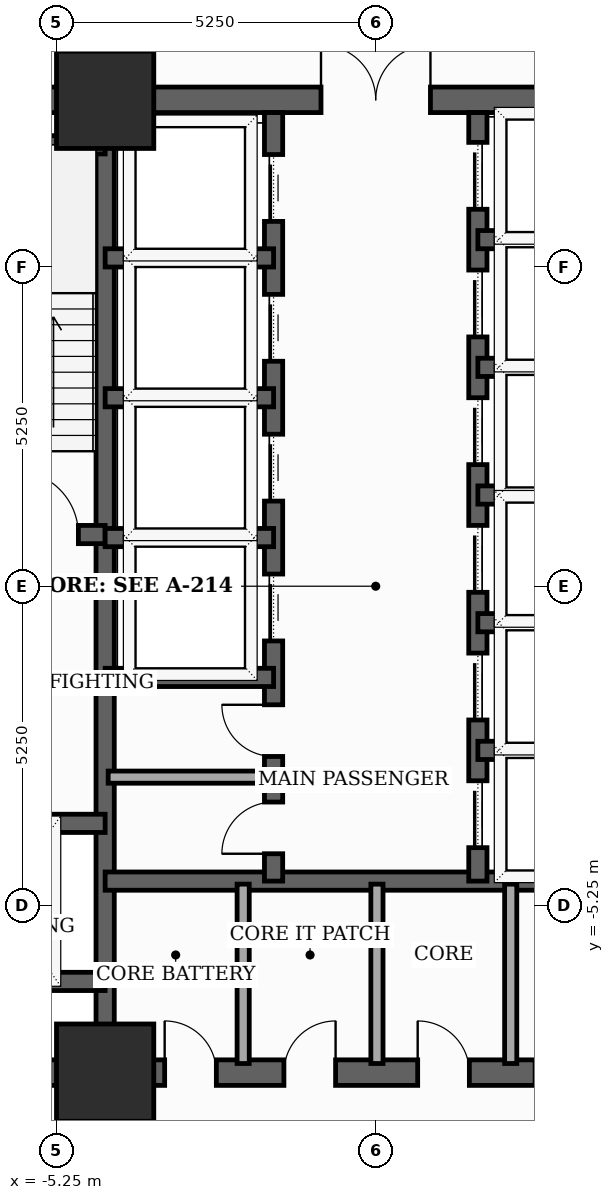
"""IFC4 building model, lengths in metres.
Left out: names, types, materials, properties, quantities, classifications, styles, units other than length and angle.
Written with IfcOpenShell. Run it as: python <this file> out.ifc"""

import sys

from ifc_helpers import new_model, si_unit, direction, frame, frame_2d, origin, origin_2d, place, context, subcontext, project, spatial, rectangle, extrude, element, fill, save


model = new_model("IFC4")
c1 = context("Model", 3, precision=1e-05, world=origin(), true_north=direction((0.0, 1.0)))
c2 = subcontext(c1, "Body", "Model", "MODEL_VIEW")
j1 = project(units=[si_unit("LENGTHUNIT", "METRE"), si_unit("PLANEANGLEUNIT", "RADIAN")], contexts=[c1])
p1 = place(None, origin())
s1 = spatial("IfcSite", under=j1, at=p1, CompositionType="ELEMENT")
p2 = place(p1, origin())
s2 = spatial("IfcBuilding", under=s1, at=p2, CompositionType="ELEMENT")
p3 = place(p2, frame((0.0, 0.0, 77.8)))
s3 = spatial("IfcBuildingStorey", under=s2, at=p3, CompositionType="ELEMENT", Elevation=77.8)
for number, where, z_axis, x_axis in (
    (1, (-4.45, -8.0, 0.0), (0.0, 0.0, 1.0), (1.0, 0.0, 0.0)),
    (2, (-4.45, 8.0, 0.0), (0.0, 0.0, 1.0), (1.0, 0.0, 0.0)),
):
    element("IfcColumn", number, at=place(p3, frame(where, z_axis=z_axis, x_axis=x_axis)), inside=s3, PredefinedType="COLUMN", context=c2, shape_type="SweptSolid", body=[
        extrude(rectangle(XDim=1.6, YDim=1.6, at=origin_2d()), origin(), (0.0, 0.0, 1.0), 3.7),
    ])
p4 = place(p3, frame((-8.0, -8.0, 0.0), z_axis=(0.0, 0.0, 1.0), x_axis=(1.0, 0.0, 0.0)))
e3 = element("IfcWall", 3, at=p4, inside=s3, PredefinedType="SHEAR", context=c2, shape_type="SweptSolid", body=[
    extrude(rectangle(XDim=16.0, YDim=0.42, at=frame_2d((8.0, 0.0))), origin(), (0.0, 0.0, 1.0), 3.5),
])
p5 = place(p4, frame((4.529, 0.0, 0.0)))
e4 = element("IfcOpeningElement", 4, at=p5, cuts=e3, PredefinedType="OPENING", context=c2, shape_type="SweptSolid", body=[
    extrude(rectangle(XDim=0.85, YDim=2.02, at=frame_2d((0.425, 1.01))), frame((0.0, 0.22, 0.0), z_axis=(0.0, -1.0, 0.0), x_axis=(1.0, 0.0, 0.0)), (0.0, 0.0, 1.0), 0.44),
])
p6 = place(p4, frame((6.49, 0.0, 0.0)))
e5 = element("IfcOpeningElement", 5, at=p6, cuts=e3, PredefinedType="OPENING", context=c2, shape_type="SweptSolid", body=[
    extrude(rectangle(XDim=0.85, YDim=2.02, at=frame_2d((0.425, 1.01))), frame((0.0, 0.22, 0.0), z_axis=(0.0, -1.0, 0.0), x_axis=(1.0, 0.0, 0.0)), (0.0, 0.0, 1.0), 0.44),
])
p7 = place(p4, frame((8.69, 0.0, 0.0)))
e6 = element("IfcOpeningElement", 6, at=p7, cuts=e3, PredefinedType="OPENING", context=c2, shape_type="SweptSolid", body=[
    extrude(rectangle(XDim=0.85, YDim=2.02, at=frame_2d((0.425, 1.01))), frame((0.0, 0.22, 0.0), z_axis=(0.0, -1.0, 0.0), x_axis=(1.0, 0.0, 0.0)), (0.0, 0.0, 1.0), 0.44),
])
p8 = place(p4, frame((10.621, 0.0, 0.0)))
e7 = element("IfcOpeningElement", 7, at=p8, cuts=e3, PredefinedType="OPENING", context=c2, shape_type="SweptSolid", body=[
    extrude(rectangle(XDim=0.85, YDim=2.02, at=frame_2d((0.425, 1.01))), frame((0.0, 0.22, 0.0), z_axis=(0.0, -1.0, 0.0), x_axis=(1.0, 0.0, 0.0)), (0.0, 0.0, 1.0), 0.44),
])
p9 = place(p3, frame((-8.0, 8.0, 0.0), z_axis=(0.0, 0.0, 1.0), x_axis=(1.0, 0.0, 0.0)))
e8 = element("IfcWall", 8, at=p9, inside=s3, PredefinedType="SHEAR", context=c2, shape_type="SweptSolid", body=[
    extrude(rectangle(XDim=16.0, YDim=0.42, at=frame_2d((8.0, 0.0))), origin(), (0.0, 0.0, 1.0), 3.5),
])
p10 = place(p9, frame((7.1, 0.0, 0.0)))
e9 = element("IfcOpeningElement", 9, at=p10, cuts=e8, PredefinedType="OPENING", context=c2, shape_type="SweptSolid", body=[
    extrude(rectangle(XDim=1.8, YDim=2.15, at=frame_2d((0.9, 1.075))), frame((0.0, 0.22, 0.0), z_axis=(0.0, -1.0, 0.0), x_axis=(1.0, 0.0, 0.0)), (0.0, 0.0, 1.0), 0.44),
])
p11 = place(p3, frame((-4.45, -7.79, 0.0), z_axis=(0.0, 0.0, 1.0), x_axis=(0.0, 1.0, 0.0)))
e10 = element("IfcWall", 10, at=p11, inside=s3, PredefinedType="SHEAR", context=c2, shape_type="SweptSolid", body=[
    extrude(rectangle(XDim=15.58, YDim=0.3, at=frame_2d((7.79, 0.0))), origin(), (0.0, 0.0, 1.0), 3.5),
])
p12 = place(p3, frame((-7.79, 0.85, 0.0), z_axis=(0.0, 0.0, 1.0), x_axis=(1.0, 0.0, 0.0)))
e11 = element("IfcWall", 11, at=p12, inside=s3, PredefinedType="SHEAR", context=c2, shape_type="SweptSolid", body=[
    extrude(rectangle(XDim=3.34, YDim=0.3, at=frame_2d((1.67, 0.0))), origin(), (0.0, 0.0, 1.0), 3.5),
])
p13 = place(p12, frame((1.85, 0.0, 0.0)))
e12 = element("IfcOpeningElement", 12, at=p13, cuts=e11, PredefinedType="OPENING", context=c2, shape_type="SweptSolid", body=[
    extrude(rectangle(XDim=1.05, YDim=2.15, at=frame_2d((0.525, 1.075))), frame((0.0, 0.16, 0.0), z_axis=(0.0, -1.0, 0.0), x_axis=(1.0, 0.0, 0.0)), (0.0, 0.0, 1.0), 0.32),
])
p14 = place(p3, frame((-7.79, 7.26, 0.0), z_axis=(0.0, 0.0, 1.0), x_axis=(1.0, 0.0, 0.0)))
e13 = element("IfcWall", 13, at=p14, inside=s3, PredefinedType="SHEAR", context=c2, shape_type="SweptSolid", body=[
    extrude(rectangle(XDim=3.34, YDim=0.3, at=frame_2d((1.67, 0.0))), origin(), (0.0, 0.0, 1.0), 3.5),
])
p15 = place(p3, frame((-7.79, -3.9, 0.0), z_axis=(0.0, 0.0, 1.0), x_axis=(1.0, 0.0, 0.0)))
e14 = element("IfcWall", 14, at=p15, inside=s3, PredefinedType="SHEAR", context=c2, shape_type="SweptSolid", body=[
    extrude(rectangle(XDim=3.34, YDim=0.3, at=frame_2d((1.67, 0.0))), origin(), (0.0, 0.0, 1.0), 3.5),
])
p16 = place(p15, frame((1.27, 0.0, 0.0)))
e15 = element("IfcOpeningElement", 15, at=p16, cuts=e14, PredefinedType="OPENING", context=c2, shape_type="SweptSolid", body=[
    extrude(rectangle(XDim=1.1, YDim=2.1, at=frame_2d((0.55, 1.05))), frame((0.0, 0.16, 0.0), z_axis=(0.0, -1.0, 0.0), x_axis=(1.0, 0.0, 0.0)), (0.0, 0.0, 1.0), 0.32),
])
p17 = place(p3, frame((-7.79, -6.5, 0.0), z_axis=(0.0, 0.0, 1.0), x_axis=(1.0, 0.0, 0.0)))
e16 = element("IfcWall", 16, at=p17, inside=s3, PredefinedType="SHEAR", context=c2, shape_type="SweptSolid", body=[
    extrude(rectangle(XDim=3.34, YDim=0.3, at=frame_2d((1.67, 0.0))), origin(), (0.0, 0.0, 1.0), 3.5),
])
p18 = place(p3, frame((-4.45, -4.85, 0.0), z_axis=(0.0, 0.0, 1.0), x_axis=(1.0, 0.0, 0.0)))
e17 = element("IfcWall", 17, at=p18, inside=s3, PredefinedType="SHEAR", context=c2, shape_type="SweptSolid", body=[
    extrude(rectangle(XDim=8.9, YDim=0.3, at=frame_2d((4.45, 0.0))), origin(), (0.0, 0.0, 1.0), 3.5),
])
p19 = place(p3, frame((-1.68, -4.85, 0.0), z_axis=(0.0, 0.0, 1.0), x_axis=(0.0, 1.0, 0.0)))
e18 = element("IfcWall", 18, at=p19, inside=s3, PredefinedType="SHEAR", context=c2, shape_type="SweptSolid", body=[
    extrude(rectangle(XDim=12.64, YDim=0.3, at=frame_2d((6.32, 0.0))), origin(), (0.0, 0.0, 1.0), 3.5),
])
p20 = place(p19, frame((3.95, 0.0, 0.0)))
e19 = element("IfcOpeningElement", 19, at=p20, cuts=e18, PredefinedType="OPENING", context=c2, shape_type="SweptSolid", body=[
    extrude(rectangle(XDim=1.1, YDim=2.1, at=frame_2d((0.55, 1.05))), frame((0.0, 0.16, 0.0), z_axis=(0.0, -1.0, 0.0), x_axis=(1.0, 0.0, 0.0)), (0.0, 0.0, 1.0), 0.32),
])
p21 = place(p19, frame((6.25, 0.0, 0.0)))
e20 = element("IfcOpeningElement", 20, at=p21, cuts=e18, PredefinedType="OPENING", context=c2, shape_type="SweptSolid", body=[
    extrude(rectangle(XDim=1.1, YDim=2.1, at=frame_2d((0.55, 1.05))), frame((0.0, 0.16, 0.0), z_axis=(0.0, -1.0, 0.0), x_axis=(1.0, 0.0, 0.0)), (0.0, 0.0, 1.0), 0.32),
])
p22 = place(p19, frame((8.55, 0.0, 0.0)))
e21 = element("IfcOpeningElement", 21, at=p22, cuts=e18, PredefinedType="OPENING", context=c2, shape_type="SweptSolid", body=[
    extrude(rectangle(XDim=1.1, YDim=2.1, at=frame_2d((0.55, 1.05))), frame((0.0, 0.16, 0.0), z_axis=(0.0, -1.0, 0.0), x_axis=(1.0, 0.0, 0.0)), (0.0, 0.0, 1.0), 0.32),
])
p23 = place(p19, frame((10.85, 0.0, 0.0)))
e22 = element("IfcOpeningElement", 22, at=p23, cuts=e18, PredefinedType="OPENING", context=c2, shape_type="SweptSolid", body=[
    extrude(rectangle(XDim=1.1, YDim=2.1, at=frame_2d((0.55, 1.05))), frame((0.0, 0.16, 0.0), z_axis=(0.0, -1.0, 0.0), x_axis=(1.0, 0.0, 0.0)), (0.0, 0.0, 1.0), 0.32),
])
p24 = place(p19, frame((0.45, 0.0, 0.0)))
e23 = element("IfcOpeningElement", 23, at=p24, cuts=e18, PredefinedType="OPENING", context=c2, shape_type="SweptSolid", body=[
    extrude(rectangle(XDim=0.85, YDim=2.02, at=frame_2d((0.425, 1.01))), frame((0.0, 0.16, 0.0), z_axis=(0.0, -1.0, 0.0), x_axis=(1.0, 0.0, 0.0)), (0.0, 0.0, 1.0), 0.32),
])
p25 = place(p19, frame((2.05, 0.0, 0.0)))
e24 = element("IfcOpeningElement", 24, at=p25, cuts=e18, PredefinedType="OPENING", context=c2, shape_type="SweptSolid", body=[
    extrude(rectangle(XDim=0.85, YDim=2.02, at=frame_2d((0.425, 1.01))), frame((0.0, 0.16, 0.0), z_axis=(0.0, -1.0, 0.0), x_axis=(1.0, 0.0, 0.0)), (0.0, 0.0, 1.0), 0.32),
])
p26 = place(p3, frame((1.68, -4.85, 0.0), z_axis=(0.0, 0.0, 1.0), x_axis=(0.0, 1.0, 0.0)))
e25 = element("IfcWall", 25, at=p26, inside=s3, PredefinedType="SHEAR", context=c2, shape_type="SweptSolid", body=[
    extrude(rectangle(XDim=12.64, YDim=0.3, at=frame_2d((6.32, 0.0))), origin(), (0.0, 0.0, 1.0), 3.5),
])
p27 = place(p26, frame((0.55, 0.0, 0.0)))
e26 = element("IfcOpeningElement", 26, at=p27, cuts=e25, PredefinedType="OPENING", context=c2, shape_type="SweptSolid", body=[
    extrude(rectangle(XDim=1.1, YDim=2.1, at=frame_2d((0.55, 1.05))), frame((0.0, 0.16, 0.0), z_axis=(0.0, -1.0, 0.0), x_axis=(1.0, 0.0, 0.0)), (0.0, 0.0, 1.0), 0.32),
])
p28 = place(p26, frame((2.65, 0.0, 0.0)))
e27 = element("IfcOpeningElement", 27, at=p28, cuts=e25, PredefinedType="OPENING", context=c2, shape_type="SweptSolid", body=[
    extrude(rectangle(XDim=1.1, YDim=2.1, at=frame_2d((0.55, 1.05))), frame((0.0, 0.16, 0.0), z_axis=(0.0, -1.0, 0.0), x_axis=(1.0, 0.0, 0.0)), (0.0, 0.0, 1.0), 0.32),
])
p29 = place(p26, frame((4.75, 0.0, 0.0)))
e28 = element("IfcOpeningElement", 28, at=p29, cuts=e25, PredefinedType="OPENING", context=c2, shape_type="SweptSolid", body=[
    extrude(rectangle(XDim=1.1, YDim=2.1, at=frame_2d((0.55, 1.05))), frame((0.0, 0.16, 0.0), z_axis=(0.0, -1.0, 0.0), x_axis=(1.0, 0.0, 0.0)), (0.0, 0.0, 1.0), 0.32),
])
p30 = place(p26, frame((6.85, 0.0, 0.0)))
e29 = element("IfcOpeningElement", 29, at=p30, cuts=e25, PredefinedType="OPENING", context=c2, shape_type="SweptSolid", body=[
    extrude(rectangle(XDim=1.1, YDim=2.1, at=frame_2d((0.55, 1.05))), frame((0.0, 0.16, 0.0), z_axis=(0.0, -1.0, 0.0), x_axis=(1.0, 0.0, 0.0)), (0.0, 0.0, 1.0), 0.32),
])
p31 = place(p26, frame((8.95, 0.0, 0.0)))
e30 = element("IfcOpeningElement", 30, at=p31, cuts=e25, PredefinedType="OPENING", context=c2, shape_type="SweptSolid", body=[
    extrude(rectangle(XDim=1.1, YDim=2.1, at=frame_2d((0.55, 1.05))), frame((0.0, 0.16, 0.0), z_axis=(0.0, -1.0, 0.0), x_axis=(1.0, 0.0, 0.0)), (0.0, 0.0, 1.0), 0.32),
])
p32 = place(p26, frame((11.05, 0.0, 0.0)))
e31 = element("IfcOpeningElement", 31, at=p32, cuts=e25, PredefinedType="OPENING", context=c2, shape_type="SweptSolid", body=[
    extrude(rectangle(XDim=1.1, YDim=2.1, at=frame_2d((0.55, 1.05))), frame((0.0, 0.16, 0.0), z_axis=(0.0, -1.0, 0.0), x_axis=(1.0, 0.0, 0.0)), (0.0, 0.0, 1.0), 0.32),
])
for number, where, z_axis, x_axis in (
    (32, (-4.45, -1.5, 0.0), (0.0, 0.0, 1.0), (1.0, 0.0, 0.0)),
    (33, (-4.45, 0.8, 0.0), (0.0, 0.0, 1.0), (1.0, 0.0, 0.0)),
    (34, (-4.45, 3.1, 0.0), (0.0, 0.0, 1.0), (1.0, 0.0, 0.0)),
    (35, (-4.45, 5.4, 0.0), (0.0, 0.0, 1.0), (1.0, 0.0, 0.0)),
    (36, (1.68, 1.5, 0.0), (0.0, 0.0, 1.0), (1.0, 0.0, 0.0)),
    (37, (1.68, 3.6, 0.0), (0.0, 0.0, 1.0), (1.0, 0.0, 0.0)),
    (38, (1.68, 5.7, 0.0), (0.0, 0.0, 1.0), (1.0, 0.0, 0.0)),
    (39, (1.68, -2.7, 0.0), (0.0, 0.0, 1.0), (1.0, 0.0, 0.0)),
    (40, (1.68, -0.6, 0.0), (0.0, 0.0, 1.0), (1.0, 0.0, 0.0)),
):
    element("IfcWall", number, at=place(p3, frame(where, z_axis=z_axis, x_axis=x_axis)), inside=s3, PredefinedType="SHEAR", context=c2, shape_type="SweptSolid", body=[
        extrude(rectangle(XDim=2.77, YDim=0.3, at=frame_2d((1.385, 0.0))), origin(), (0.0, 0.0, 1.0), 3.5),
    ])
for number, where, z_axis, x_axis in (
    (41, (-2.18, -7.85, 0.0), (0.0, 0.0, 1.0), (0.0, 1.0, 0.0)),
    (42, (0.02, -7.85, 0.0), (0.0, 0.0, 1.0), (0.0, 1.0, 0.0)),
    (43, (2.22, -7.85, 0.0), (0.0, 0.0, 1.0), (0.0, 1.0, 0.0)),
):
    element("IfcWall", number, at=place(p3, frame(where, z_axis=z_axis, x_axis=x_axis)), inside=s3, PredefinedType="SOLIDWALL", context=c2, shape_type="SweptSolid", body=[
        extrude(rectangle(XDim=2.95, YDim=0.2, at=frame_2d((1.475, 0.0))), origin(), (0.0, 0.0, 1.0), 2.885),
    ])
p33 = place(p3, frame((-4.4, -3.14, 0.0), z_axis=(0.0, 0.0, 1.0), x_axis=(1.0, 0.0, 0.0)))
e44 = element("IfcWall", 44, at=p33, inside=s3, PredefinedType="SOLIDWALL", context=c2, shape_type="SweptSolid", body=[
    extrude(rectangle(XDim=2.68, YDim=0.2, at=frame_2d((1.34, 0.0))), origin(), (0.0, 0.0, 1.0), 3.5),
])
p34 = place(p5, origin())
e45 = element("IfcDoor", 45, at=p34, inside=s3, OperationType="SINGLE_SWING_LEFT", PredefinedType="TRAPDOOR", context=c2, shape_type="SweptSolid", body=[
    extrude(rectangle(XDim=0.85, YDim=2.02, at=frame_2d((0.425, 1.01))), frame((0.0, 0.025, 0.0), z_axis=(0.0, -1.0, 0.0), x_axis=(1.0, 0.0, 0.0)), (0.0, 0.0, 1.0), 0.05),
])
fill(e4, e45)
p35 = place(p6, origin())
e46 = element("IfcDoor", 46, at=p35, inside=s3, OperationType="SINGLE_SWING_RIGHT", PredefinedType="TRAPDOOR", context=c2, shape_type="SweptSolid", body=[
    extrude(rectangle(XDim=0.85, YDim=2.02, at=frame_2d((0.425, 1.01))), frame((0.0, 0.025, 0.0), z_axis=(0.0, -1.0, 0.0), x_axis=(1.0, 0.0, 0.0)), (0.0, 0.0, 1.0), 0.05),
])
fill(e5, e46)
p36 = place(p7, origin())
e47 = element("IfcDoor", 47, at=p36, inside=s3, OperationType="SINGLE_SWING_LEFT", PredefinedType="TRAPDOOR", context=c2, shape_type="SweptSolid", body=[
    extrude(rectangle(XDim=0.85, YDim=2.02, at=frame_2d((0.425, 1.01))), frame((0.0, 0.025, 0.0), z_axis=(0.0, -1.0, 0.0), x_axis=(1.0, 0.0, 0.0)), (0.0, 0.0, 1.0), 0.05),
])
fill(e6, e47)
p37 = place(p10, origin())
e48 = element("IfcDoor", 48, at=p37, inside=s3, OperationType="DOUBLE_DOOR_SINGLE_SWING", PredefinedType="DOOR", context=c2, shape_type="SweptSolid", body=[
    extrude(rectangle(XDim=1.8, YDim=2.15, at=frame_2d((0.9, 1.075))), frame((0.0, 0.025, 0.0), z_axis=(0.0, -1.0, 0.0), x_axis=(1.0, 0.0, 0.0)), (0.0, 0.0, 1.0), 0.05),
])
fill(e9, e48)
p38 = place(p13, origin())
e49 = element("IfcDoor", 49, at=p38, inside=s3, OperationType="SINGLE_SWING_LEFT", PredefinedType="DOOR", context=c2, shape_type="SweptSolid", body=[
    extrude(rectangle(XDim=1.05, YDim=2.15, at=frame_2d((0.525, 1.075))), frame((0.0, 0.025, 0.0), z_axis=(0.0, -1.0, 0.0), x_axis=(1.0, 0.0, 0.0)), (0.0, 0.0, 1.0), 0.05),
])
fill(e12, e49)
p39 = place(p20, origin())
e50 = element("IfcDoor", 50, at=p39, inside=s3, OperationType="SLIDING_TO_LEFT", PredefinedType="DOOR", context=c2, shape_type="SweptSolid", body=[
    extrude(rectangle(XDim=1.1, YDim=2.1, at=frame_2d((0.55, 1.05))), frame((0.0, 0.025, 0.0), z_axis=(0.0, -1.0, 0.0), x_axis=(1.0, 0.0, 0.0)), (0.0, 0.0, 1.0), 0.05),
])
fill(e19, e50)
p40 = place(p21, origin())
e51 = element("IfcDoor", 51, at=p40, inside=s3, OperationType="SLIDING_TO_LEFT", PredefinedType="DOOR", context=c2, shape_type="SweptSolid", body=[
    extrude(rectangle(XDim=1.1, YDim=2.1, at=frame_2d((0.55, 1.05))), frame((0.0, 0.025, 0.0), z_axis=(0.0, -1.0, 0.0), x_axis=(1.0, 0.0, 0.0)), (0.0, 0.0, 1.0), 0.05),
])
fill(e20, e51)
p41 = place(p22, origin())
e52 = element("IfcDoor", 52, at=p41, inside=s3, OperationType="SLIDING_TO_LEFT", PredefinedType="DOOR", context=c2, shape_type="SweptSolid", body=[
    extrude(rectangle(XDim=1.1, YDim=2.1, at=frame_2d((0.55, 1.05))), frame((0.0, 0.025, 0.0), z_axis=(0.0, -1.0, 0.0), x_axis=(1.0, 0.0, 0.0)), (0.0, 0.0, 1.0), 0.05),
])
fill(e21, e52)
p42 = place(p23, origin())
e53 = element("IfcDoor", 53, at=p42, inside=s3, OperationType="SLIDING_TO_LEFT", PredefinedType="DOOR", context=c2, shape_type="SweptSolid", body=[
    extrude(rectangle(XDim=1.1, YDim=2.1, at=frame_2d((0.55, 1.05))), frame((0.0, 0.025, 0.0), z_axis=(0.0, -1.0, 0.0), x_axis=(1.0, 0.0, 0.0)), (0.0, 0.0, 1.0), 0.05),
])
fill(e22, e53)
p43 = place(p24, origin())
e54 = element("IfcDoor", 54, at=p43, inside=s3, OperationType="SINGLE_SWING_LEFT", PredefinedType="TRAPDOOR", context=c2, shape_type="SweptSolid", body=[
    extrude(rectangle(XDim=0.85, YDim=2.02, at=frame_2d((0.425, 1.01))), frame((0.0, 0.025, 0.0), z_axis=(0.0, -1.0, 0.0), x_axis=(1.0, 0.0, 0.0)), (0.0, 0.0, 1.0), 0.05),
])
fill(e23, e54)
p44 = place(p25, origin())
e55 = element("IfcDoor", 55, at=p44, inside=s3, OperationType="SINGLE_SWING_RIGHT", PredefinedType="TRAPDOOR", context=c2, shape_type="SweptSolid", body=[
    extrude(rectangle(XDim=0.85, YDim=2.02, at=frame_2d((0.425, 1.01))), frame((0.0, 0.025, 0.0), z_axis=(0.0, -1.0, 0.0), x_axis=(1.0, 0.0, 0.0)), (0.0, 0.0, 1.0), 0.05),
])
fill(e24, e55)
p45 = place(p27, origin())
e56 = element("IfcDoor", 56, at=p45, inside=s3, OperationType="SLIDING_TO_LEFT", PredefinedType="DOOR", context=c2, shape_type="SweptSolid", body=[
    extrude(rectangle(XDim=1.1, YDim=2.1, at=frame_2d((0.55, 1.05))), frame((0.0, 0.025, 0.0), z_axis=(0.0, -1.0, 0.0), x_axis=(1.0, 0.0, 0.0)), (0.0, 0.0, 1.0), 0.05),
])
fill(e26, e56)
p46 = place(p28, origin())
e57 = element("IfcDoor", 57, at=p46, inside=s3, OperationType="SLIDING_TO_LEFT", PredefinedType="DOOR", context=c2, shape_type="SweptSolid", body=[
    extrude(rectangle(XDim=1.1, YDim=2.1, at=frame_2d((0.55, 1.05))), frame((0.0, 0.025, 0.0), z_axis=(0.0, -1.0, 0.0), x_axis=(1.0, 0.0, 0.0)), (0.0, 0.0, 1.0), 0.05),
])
fill(e27, e57)
p47 = place(p29, origin())
e58 = element("IfcDoor", 58, at=p47, inside=s3, OperationType="SLIDING_TO_LEFT", PredefinedType="DOOR", context=c2, shape_type="SweptSolid", body=[
    extrude(rectangle(XDim=1.1, YDim=2.1, at=frame_2d((0.55, 1.05))), frame((0.0, 0.025, 0.0), z_axis=(0.0, -1.0, 0.0), x_axis=(1.0, 0.0, 0.0)), (0.0, 0.0, 1.0), 0.05),
])
fill(e28, e58)
p48 = place(p30, origin())
e59 = element("IfcDoor", 59, at=p48, inside=s3, OperationType="SLIDING_TO_LEFT", PredefinedType="DOOR", context=c2, shape_type="SweptSolid", body=[
    extrude(rectangle(XDim=1.1, YDim=2.1, at=frame_2d((0.55, 1.05))), frame((0.0, 0.025, 0.0), z_axis=(0.0, -1.0, 0.0), x_axis=(1.0, 0.0, 0.0)), (0.0, 0.0, 1.0), 0.05),
])
fill(e29, e59)
p49 = place(p31, origin())
e60 = element("IfcDoor", 60, at=p49, inside=s3, OperationType="SLIDING_TO_LEFT", PredefinedType="DOOR", context=c2, shape_type="SweptSolid", body=[
    extrude(rectangle(XDim=1.1, YDim=2.1, at=frame_2d((0.55, 1.05))), frame((0.0, 0.025, 0.0), z_axis=(0.0, -1.0, 0.0), x_axis=(1.0, 0.0, 0.0)), (0.0, 0.0, 1.0), 0.05),
])
fill(e30, e60)
p50 = place(p32, origin())
e61 = element("IfcDoor", 61, at=p50, inside=s3, OperationType="SLIDING_TO_LEFT", PredefinedType="DOOR", context=c2, shape_type="SweptSolid", body=[
    extrude(rectangle(XDim=1.1, YDim=2.1, at=frame_2d((0.55, 1.05))), frame((0.0, 0.025, 0.0), z_axis=(0.0, -1.0, 0.0), x_axis=(1.0, 0.0, 0.0)), (0.0, 0.0, 1.0), 0.05),
])
fill(e31, e61)
save(model, sys.argv[1])
